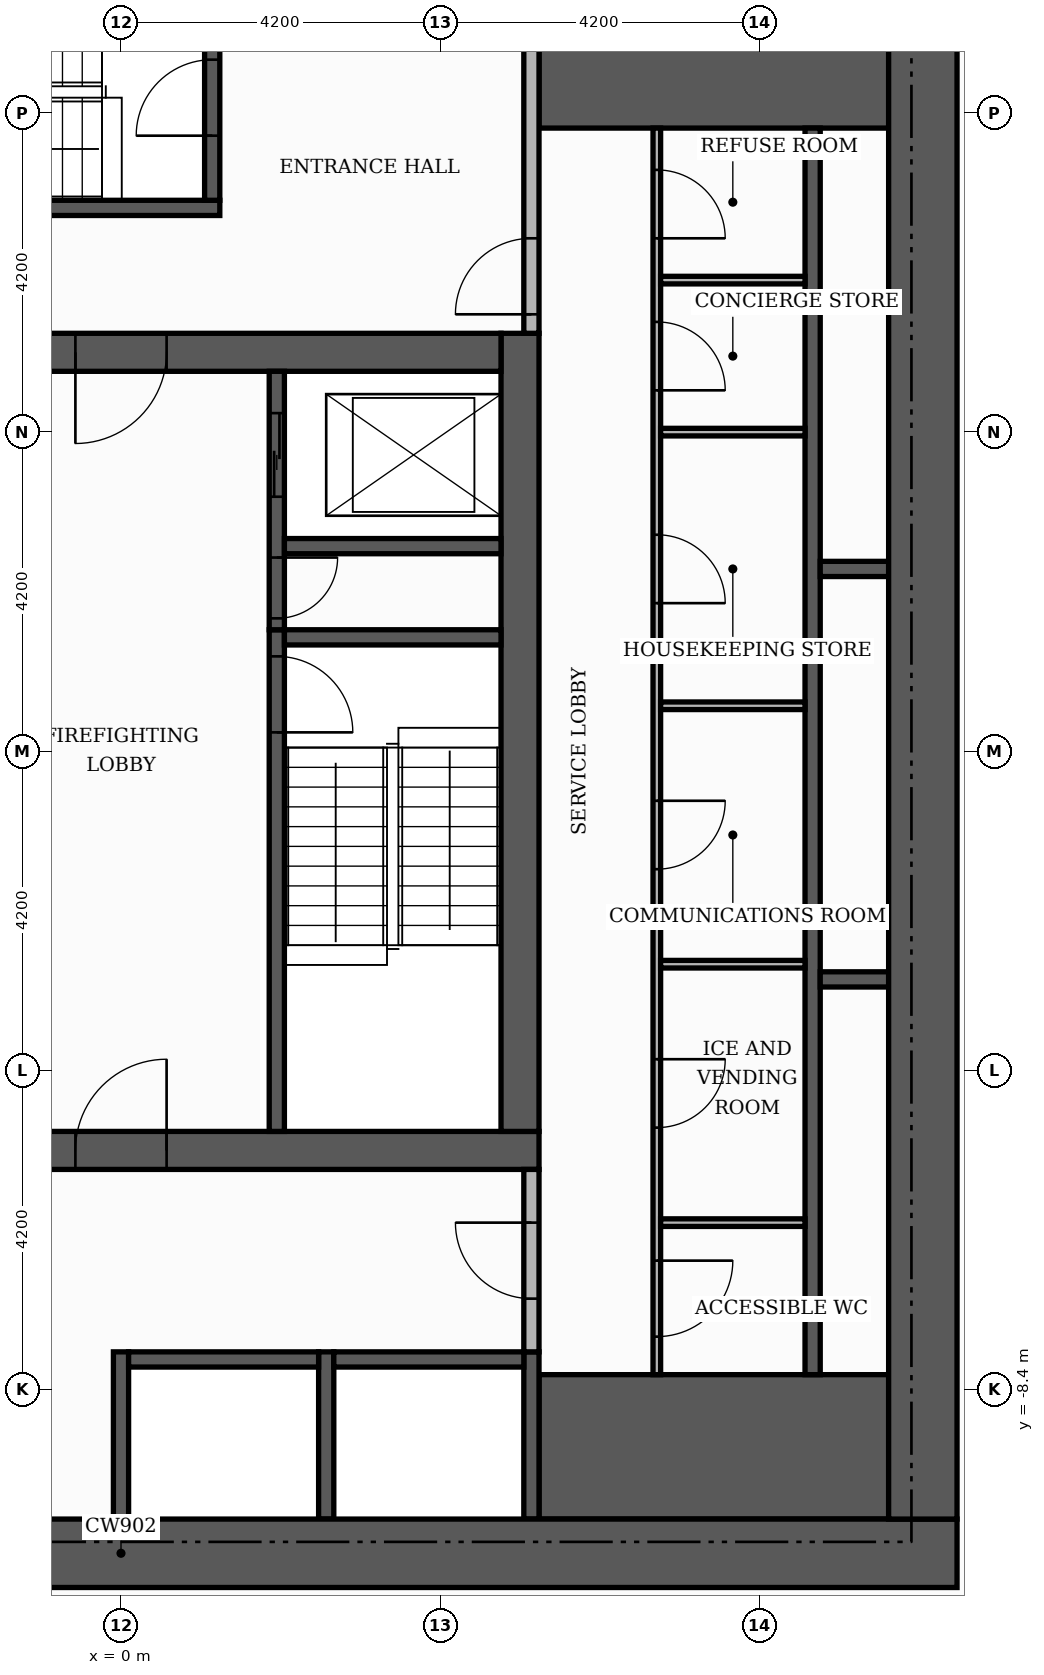
"""IFC4 building model, lengths in metres.
Left out: names, types, materials, properties, quantities, classifications, styles, units other than length and angle.
Written with IfcOpenShell. Run it as: python <this file> out.ifc"""

import sys

from ifc_helpers import new_model, si_unit, direction, frame, frame_2d, origin, place, context, subcontext, project, spatial, rectangle, extrude, element, fill, save


model = new_model("IFC4")
c1 = context("Model", 3, precision=1e-05, world=origin(), true_north=direction((0.0, 1.0)))
c2 = subcontext(c1, "Body", "Model", "MODEL_VIEW")
j1 = project(units=[si_unit("LENGTHUNIT", "METRE"), si_unit("PLANEANGLEUNIT", "RADIAN")], contexts=[c1])
p1 = place(None, origin())
s1 = spatial("IfcSite", under=j1, at=p1, CompositionType="ELEMENT")
p2 = place(p1, origin())
s2 = spatial("IfcBuilding", under=s1, at=p2, CompositionType="ELEMENT")
p3 = place(p2, frame((0.0, 0.0, 106.5)))
s3 = spatial("IfcBuildingStorey", under=s2, at=p3, CompositionType="ELEMENT", Elevation=106.5)
p4 = place(p3, frame((-5.5, -5.25, 0.0), z_axis=(0.0, 0.0, 1.0), x_axis=(1.0, 0.0, 0.0)))
e1 = element("IfcWall", 1, at=p4, inside=s3, PredefinedType="SHEAR", context=c2, shape_type="SweptSolid", body=[
    extrude(rectangle(XDim=11.0, YDim=0.5, at=frame_2d((5.5, 0.0))), origin(), (0.0, 0.0, 1.0), 3.48),
])
p5 = place(p4, frame((4.9, 0.0, 0.0)))
e2 = element("IfcOpeningElement", 2, at=p5, cuts=e1, PredefinedType="OPENING", context=c2, shape_type="SweptSolid", body=[
    extrude(rectangle(XDim=1.2, YDim=2.1, at=frame_2d((0.6, 1.05))), frame((0.0, 0.26, 0.0), z_axis=(0.0, -1.0, 0.0), x_axis=(1.0, 0.0, 0.0)), (0.0, 0.0, 1.0), 0.52),
])
p6 = place(p3, frame((5.25, -5.0, 0.0), z_axis=(0.0, 0.0, 1.0), x_axis=(0.0, 1.0, 0.0)))
e3 = element("IfcWall", 3, at=p6, inside=s3, PredefinedType="SHEAR", context=c2, shape_type="SweptSolid", body=[
    extrude(rectangle(XDim=10.5, YDim=0.5, at=frame_2d((5.25, 0.0))), origin(), (0.0, 0.0, 1.0), 3.48),
])
p7 = place(p3, frame((-5.0, 5.25, 0.0), z_axis=(0.0, 0.0, 1.0), x_axis=(1.0, 0.0, 0.0)))
e4 = element("IfcWall", 4, at=p7, inside=s3, PredefinedType="SHEAR", context=c2, shape_type="SweptSolid", body=[
    extrude(rectangle(XDim=10.0, YDim=0.5, at=frame_2d((5.0, 0.0))), origin(), (0.0, 0.0, 1.0), 3.48),
])
p8 = place(p7, frame((4.4, 0.0, 0.0)))
e5 = element("IfcOpeningElement", 5, at=p8, cuts=e4, PredefinedType="OPENING", context=c2, shape_type="SweptSolid", body=[
    extrude(rectangle(XDim=1.2, YDim=2.1, at=frame_2d((0.6, 1.05))), frame((0.0, 0.26, 0.0), z_axis=(0.0, -1.0, 0.0), x_axis=(1.0, 0.0, 0.0)), (0.0, 0.0, 1.0), 0.52),
])
for number, where, z_axis, x_axis in (
    (6, (5.5, -9.15, 0.0), (0.0, 0.0, 1.0), (1.0, 0.0, 0.0)),
    (7, (5.5, 9.15, 0.0), (0.0, 0.0, 1.0), (1.0, 0.0, 0.0)),
):
    element("IfcWall", number, at=place(p3, frame(where, z_axis=z_axis, x_axis=x_axis)), inside=s3, PredefinedType="SHEAR", context=c2, shape_type="SweptSolid", body=[
        extrude(rectangle(XDim=4.6, YDim=1.9, at=frame_2d((2.3, 0.0))), origin(), (0.0, 0.0, 1.0), 3.48),
    ])
p9 = place(p3, frame((2.05, -5.0, 0.0), z_axis=(0.0, 0.0, 1.0), x_axis=(0.0, 1.0, 0.0)))
e8 = element("IfcWall", 8, at=p9, inside=s3, PredefinedType="SHEAR", context=c2, shape_type="SweptSolid", body=[
    extrude(rectangle(XDim=6.6, YDim=0.2, at=frame_2d((3.3, 0.0))), origin(), (0.0, 0.0, 1.0), 3.48),
])
p10 = place(p9, frame((5.25, 0.0, 0.0)))
e9 = element("IfcOpeningElement", 9, at=p10, cuts=e8, PredefinedType="OPENING", context=c2, shape_type="SweptSolid", body=[
    extrude(rectangle(XDim=1.0, YDim=2.1, at=frame_2d((0.5, 1.05))), frame((0.0, 0.11, 0.0), z_axis=(0.0, -1.0, 0.0), x_axis=(1.0, 0.0, 0.0)), (0.0, 0.0, 1.0), 0.22),
])
p11 = place(p3, frame((2.15, 1.5, 0.0), z_axis=(0.0, 0.0, 1.0), x_axis=(1.0, 0.0, 0.0)))
e10 = element("IfcWall", 10, at=p11, inside=s3, PredefinedType="SHEAR", context=c2, shape_type="SweptSolid", body=[
    extrude(rectangle(XDim=2.85, YDim=0.2, at=frame_2d((1.425, 0.0))), origin(), (0.0, 0.0, 1.0), 3.48),
])
p12 = place(p3, frame((-5.5, 7.15, 0.0), z_axis=(0.0, 0.0, 1.0), x_axis=(1.0, 0.0, 0.0)))
e11 = element("IfcWall", 11, at=p12, inside=s3, PredefinedType="SHEAR", context=c2, shape_type="SweptSolid", body=[
    extrude(rectangle(XDim=6.8, YDim=0.2, at=frame_2d((3.4, 0.0))), origin(), (0.0, 0.0, 1.0), 3.48),
])
p13 = place(p3, frame((1.2, 7.25, 0.0), z_axis=(0.0, 0.0, 1.0), x_axis=(0.0, 1.0, 0.0)))
e12 = element("IfcWall", 12, at=p13, inside=s3, PredefinedType="SHEAR", context=c2, shape_type="SweptSolid", body=[
    extrude(rectangle(XDim=2.85, YDim=0.2, at=frame_2d((1.425, 0.0))), origin(), (0.0, 0.0, 1.0), 3.48),
])
p14 = place(p13, frame((0.85, 0.0, 0.0)))
e13 = element("IfcOpeningElement", 13, at=p14, cuts=e12, PredefinedType="OPENING", context=c2, shape_type="SweptSolid", body=[
    extrude(rectangle(XDim=1.0, YDim=2.1, at=frame_2d((0.5, 1.05))), frame((0.0, 0.11, 0.0), z_axis=(0.0, -1.0, 0.0), x_axis=(1.0, 0.0, 0.0)), (0.0, 0.0, 1.0), 0.22),
])
for number, where, z_axis, x_axis in (
    (14, (0.0, -10.1, 0.0), (0.0, 0.0, 1.0), (0.0, 1.0, 0.0)),
    (15, (2.7, -10.1, 0.0), (0.0, 0.0, 1.0), (0.0, 1.0, 0.0)),
    (16, (5.4, -10.1, 0.0), (0.0, 0.0, 1.0), (0.0, 1.0, 0.0)),
):
    element("IfcWall", number, at=place(p3, frame(where, z_axis=z_axis, x_axis=x_axis)), inside=s3, PredefinedType="SHEAR", context=c2, shape_type="SweptSolid", body=[
        extrude(rectangle(XDim=2.2, YDim=0.2, at=frame_2d((1.1, 0.0))), origin(), (0.0, 0.0, 1.0), 3.48),
    ])
p15 = place(p3, frame((9.1, -8.2, 0.0), z_axis=(0.0, 0.0, 1.0), x_axis=(0.0, 1.0, 0.0)))
e17 = element("IfcWall", 17, at=p15, inside=s3, PredefinedType="SHEAR", context=c2, shape_type="SweptSolid", body=[
    extrude(rectangle(XDim=16.4, YDim=0.2, at=frame_2d((8.2, 0.0))), origin(), (0.0, 0.0, 1.0), 3.48),
])
for number, where, z_axis, x_axis in (
    (18, (0.1, -8.0, 0.0), (0.0, 0.0, 1.0), (1.0, 0.0, 0.0)),
    (19, (2.8, -8.0, 0.0), (0.0, 0.0, 1.0), (1.0, 0.0, 0.0)),
):
    element("IfcWall", number, at=place(p3, frame(where, z_axis=z_axis, x_axis=x_axis)), inside=s3, PredefinedType="SHEAR", context=c2, shape_type="SweptSolid", body=[
        extrude(rectangle(XDim=2.5, YDim=0.2, at=frame_2d((1.25, 0.0))), origin(), (0.0, 0.0, 1.0), 3.48),
    ])
p16 = place(p3, frame((9.2, -3.0, 0.0), z_axis=(0.0, 0.0, 1.0), x_axis=(1.0, 0.0, 0.0)))
e20 = element("IfcWall", 20, at=p16, inside=s3, PredefinedType="SHEAR", context=c2, shape_type="SweptSolid", body=[
    extrude(rectangle(XDim=0.9, YDim=0.2, at=frame_2d((0.45, 0.0))), origin(), (0.0, 0.0, 1.0), 3.48),
])
p17 = place(p3, frame((2.05, 1.6, 0.0), z_axis=(0.0, 0.0, 1.0), x_axis=(0.0, 1.0, 0.0)))
e21 = element("IfcWall", 21, at=p17, inside=s3, PredefinedType="SHEAR", context=c2, shape_type="SweptSolid", body=[
    extrude(rectangle(XDim=3.4, YDim=0.2, at=frame_2d((1.7, 0.0))), origin(), (0.0, 0.0, 1.0), 3.48),
])
p18 = place(p17, frame((1.75, 0.0, 0.0)))
e22 = element("IfcOpeningElement", 22, at=p18, cuts=e21, PredefinedType="OPENING", context=c2, shape_type="SweptSolid", body=[
    extrude(rectangle(XDim=1.1, YDim=2.1, at=frame_2d((0.55, 1.05))), frame((0.0, 0.11, 0.0), z_axis=(0.0, -1.0, 0.0), x_axis=(1.0, 0.0, 0.0)), (0.0, 0.0, 1.0), 0.22),
])
p19 = place(p17, frame((0.15, 0.0, 0.0)))
e23 = element("IfcOpeningElement", 23, at=p19, cuts=e21, PredefinedType="OPENING", context=c2, shape_type="SweptSolid", body=[
    extrude(rectangle(XDim=0.8, YDim=2.1, at=frame_2d((0.4, 1.05))), frame((0.0, 0.11, 0.0), z_axis=(0.0, -1.0, 0.0), x_axis=(1.0, 0.0, 0.0)), (0.0, 0.0, 1.0), 0.22),
])
p20 = place(p3, frame((9.2, 2.4, 0.0), z_axis=(0.0, 0.0, 1.0), x_axis=(1.0, 0.0, 0.0)))
e24 = element("IfcWall", 24, at=p20, inside=s3, PredefinedType="SHEAR", context=c2, shape_type="SweptSolid", body=[
    extrude(rectangle(XDim=0.9, YDim=0.2, at=frame_2d((0.45, 0.0))), origin(), (0.0, 0.0, 1.0), 3.48),
])
p21 = place(p3, frame((2.15, 2.7, 0.0), z_axis=(0.0, 0.0, 1.0), x_axis=(1.0, 0.0, 0.0)))
e25 = element("IfcWall", 25, at=p21, inside=s3, PredefinedType="SHEAR", context=c2, shape_type="SweptSolid", body=[
    extrude(rectangle(XDim=2.85, YDim=0.2, at=frame_2d((1.425, 0.0))), origin(), (0.0, 0.0, 1.0), 3.48),
])
p22 = place(p3, frame((-11.0, -10.55, 0.0), z_axis=(0.0, 0.0, 1.0), x_axis=(1.0, 0.0, 0.0)))
e26 = element("IfcWall", 26, at=p22, inside=s3, PredefinedType="SHEAR", context=c2, shape_type="SweptSolid", body=[
    extrude(rectangle(XDim=22.0, YDim=0.9, at=frame_2d((11.0, 0.0))), origin(), (0.0, 0.0, 1.0), 3.48),
])
p23 = place(p22, frame((7.4, 0.0, 0.0)))
e27 = element("IfcOpeningElement", 27, at=p23, cuts=e26, PredefinedType="OPENING", context=c2, shape_type="SweptSolid", body=[
    extrude(rectangle(XDim=1.8, YDim=2.2, at=frame_2d((0.9, 1.1))), frame((0.0, 0.46, 0.0), z_axis=(0.0, -1.0, 0.0), x_axis=(1.0, 0.0, 0.0)), (0.0, 0.0, 1.0), 0.92),
])
p24 = place(p3, frame((10.55, -10.1, 0.0), z_axis=(0.0, 0.0, 1.0), x_axis=(0.0, 1.0, 0.0)))
e28 = element("IfcWall", 28, at=p24, inside=s3, PredefinedType="SHEAR", context=c2, shape_type="SweptSolid", body=[
    extrude(rectangle(XDim=20.2, YDim=0.9, at=frame_2d((10.1, 0.0))), origin(), (0.0, 0.0, 1.0), 3.48),
])
p25 = place(p3, frame((7.05, -8.2, 0.0), z_axis=(0.0, 0.0, 1.0), x_axis=(0.0, 1.0, 0.0)))
e29 = element("IfcWall", 29, at=p25, inside=s3, PredefinedType="PARTITIONING", context=c2, shape_type="SweptSolid", body=[
    extrude(rectangle(XDim=16.4, YDim=0.1, at=frame_2d((8.2, 0.0))), origin(), (0.0, 0.0, 1.0), 3.48),
])
p26 = place(p25, frame((0.5, 0.0, 0.0)))
e30 = element("IfcOpeningElement", 30, at=p26, cuts=e29, PredefinedType="OPENING", context=c2, shape_type="SweptSolid", body=[
    extrude(rectangle(XDim=1.0, YDim=2.1, at=frame_2d((0.5, 1.05))), frame((0.0, 0.06, 0.0), z_axis=(0.0, -1.0, 0.0), x_axis=(1.0, 0.0, 0.0)), (0.0, 0.0, 1.0), 0.12),
])
p27 = place(p25, frame((3.25, 0.0, 0.0)))
e31 = element("IfcOpeningElement", 31, at=p27, cuts=e29, PredefinedType="OPENING", context=c2, shape_type="SweptSolid", body=[
    extrude(rectangle(XDim=0.9, YDim=2.1, at=frame_2d((0.45, 1.05))), frame((0.0, 0.06, 0.0), z_axis=(0.0, -1.0, 0.0), x_axis=(1.0, 0.0, 0.0)), (0.0, 0.0, 1.0), 0.12),
])
p28 = place(p25, frame((6.65, 0.0, 0.0)))
e32 = element("IfcOpeningElement", 32, at=p28, cuts=e29, PredefinedType="OPENING", context=c2, shape_type="SweptSolid", body=[
    extrude(rectangle(XDim=0.9, YDim=2.1, at=frame_2d((0.45, 1.05))), frame((0.0, 0.06, 0.0), z_axis=(0.0, -1.0, 0.0), x_axis=(1.0, 0.0, 0.0)), (0.0, 0.0, 1.0), 0.12),
])
p29 = place(p25, frame((10.15, 0.0, 0.0)))
e33 = element("IfcOpeningElement", 33, at=p29, cuts=e29, PredefinedType="OPENING", context=c2, shape_type="SweptSolid", body=[
    extrude(rectangle(XDim=0.9, YDim=2.1, at=frame_2d((0.45, 1.05))), frame((0.0, 0.06, 0.0), z_axis=(0.0, -1.0, 0.0), x_axis=(1.0, 0.0, 0.0)), (0.0, 0.0, 1.0), 0.12),
])
p30 = place(p25, frame((12.95, 0.0, 0.0)))
e34 = element("IfcOpeningElement", 34, at=p30, cuts=e29, PredefinedType="OPENING", context=c2, shape_type="SweptSolid", body=[
    extrude(rectangle(XDim=0.9, YDim=2.1, at=frame_2d((0.45, 1.05))), frame((0.0, 0.06, 0.0), z_axis=(0.0, -1.0, 0.0), x_axis=(1.0, 0.0, 0.0)), (0.0, 0.0, 1.0), 0.12),
])
p31 = place(p25, frame((14.95, 0.0, 0.0)))
e35 = element("IfcOpeningElement", 35, at=p31, cuts=e29, PredefinedType="OPENING", context=c2, shape_type="SweptSolid", body=[
    extrude(rectangle(XDim=0.9, YDim=2.1, at=frame_2d((0.45, 1.05))), frame((0.0, 0.06, 0.0), z_axis=(0.0, -1.0, 0.0), x_axis=(1.0, 0.0, 0.0)), (0.0, 0.0, 1.0), 0.12),
])
p32 = place(p3, frame((5.4, -7.9, 0.0), z_axis=(0.0, 0.0, 1.0), x_axis=(0.0, 1.0, 0.0)))
e36 = element("IfcWall", 36, at=p32, inside=s3, PredefinedType="PARTITIONING", context=c2, shape_type="SweptSolid", body=[
    extrude(rectangle(XDim=2.4, YDim=0.2, at=frame_2d((1.2, 0.0))), origin(), (0.0, 0.0, 1.0), 3.48),
])
p33 = place(p32, frame((0.7, 0.0, 0.0)))
e37 = element("IfcOpeningElement", 37, at=p33, cuts=e36, PredefinedType="OPENING", context=c2, shape_type="SweptSolid", body=[
    extrude(rectangle(XDim=1.0, YDim=2.1, at=frame_2d((0.5, 1.05))), frame((0.0, 0.11, 0.0), z_axis=(0.0, -1.0, 0.0), x_axis=(1.0, 0.0, 0.0)), (0.0, 0.0, 1.0), 0.22),
])
for number, where, z_axis, x_axis in (
    (38, (7.1, -6.2, 0.0), (0.0, 0.0, 1.0), (1.0, 0.0, 0.0)),
    (39, (7.1, -2.8, 0.0), (0.0, 0.0, 1.0), (1.0, 0.0, 0.0)),
    (40, (7.1, 0.6, 0.0), (0.0, 0.0, 1.0), (1.0, 0.0, 0.0)),
    (41, (7.1, 4.2, 0.0), (0.0, 0.0, 1.0), (1.0, 0.0, 0.0)),
):
    element("IfcWall", number, at=place(p3, frame(where, z_axis=z_axis, x_axis=x_axis)), inside=s3, PredefinedType="PARTITIONING", context=c2, shape_type="SweptSolid", body=[
        extrude(rectangle(XDim=1.9, YDim=0.1, at=frame_2d((0.95, 0.0))), origin(), (0.0, 0.0, 1.0), 3.48),
    ])
p34 = place(p3, frame((5.4, 5.5, 0.0), z_axis=(0.0, 0.0, 1.0), x_axis=(0.0, 1.0, 0.0)))
e42 = element("IfcWall", 42, at=p34, inside=s3, PredefinedType="PARTITIONING", context=c2, shape_type="SweptSolid", body=[
    extrude(rectangle(XDim=4.6, YDim=0.2, at=frame_2d((2.3, 0.0))), origin(), (0.0, 0.0, 1.0), 3.48),
])
p35 = place(p34, frame((0.25, 0.0, 0.0)))
e43 = element("IfcOpeningElement", 43, at=p35, cuts=e42, PredefinedType="OPENING", context=c2, shape_type="SweptSolid", body=[
    extrude(rectangle(XDim=1.0, YDim=2.1, at=frame_2d((0.5, 1.05))), frame((0.0, 0.11, 0.0), z_axis=(0.0, -1.0, 0.0), x_axis=(1.0, 0.0, 0.0)), (0.0, 0.0, 1.0), 0.22),
])
p36 = place(p3, frame((7.1, 6.2, 0.0), z_axis=(0.0, 0.0, 1.0), x_axis=(1.0, 0.0, 0.0)))
e44 = element("IfcWall", 44, at=p36, inside=s3, PredefinedType="PARTITIONING", context=c2, shape_type="SweptSolid", body=[
    extrude(rectangle(XDim=1.9, YDim=0.1, at=frame_2d((0.95, 0.0))), origin(), (0.0, 0.0, 1.0), 3.48),
])
p37 = place(p18, origin())
e45 = element("IfcDoor", 45, at=p37, inside=s3, OperationType="SLIDING_TO_LEFT", PredefinedType="DOOR", context=c2, shape_type="SweptSolid", body=[
    extrude(rectangle(XDim=1.1, YDim=2.1, at=frame_2d((0.55, 1.05))), frame((0.0, 0.025, 0.0), z_axis=(0.0, -1.0, 0.0), x_axis=(1.0, 0.0, 0.0)), (0.0, 0.0, 1.0), 0.05),
])
fill(e22, e45)
p38 = place(p10, frame((1.0, 0.0, 0.0), z_axis=(0.0, 0.0, 1.0), x_axis=(-1.0, 0.0, 0.0)))
e46 = element("IfcDoor", 46, at=p38, inside=s3, OperationType="SINGLE_SWING_LEFT", PredefinedType="DOOR", context=c2, shape_type="SweptSolid", body=[
    extrude(rectangle(XDim=1.0, YDim=2.1, at=frame_2d((0.5, 1.05))), frame((0.0, 0.025, 0.0), z_axis=(0.0, -1.0, 0.0), x_axis=(1.0, 0.0, 0.0)), (0.0, 0.0, 1.0), 0.05),
])
fill(e9, e46)
p39 = place(p19, frame((0.8, 0.0, 0.0), z_axis=(0.0, 0.0, 1.0), x_axis=(-1.0, 0.0, 0.0)))
e47 = element("IfcDoor", 47, at=p39, inside=s3, OperationType="SINGLE_SWING_RIGHT", PredefinedType="DOOR", context=c2, shape_type="SweptSolid", body=[
    extrude(rectangle(XDim=0.8, YDim=2.1, at=frame_2d((0.4, 1.05))), frame((0.0, 0.025, 0.0), z_axis=(0.0, -1.0, 0.0), x_axis=(1.0, 0.0, 0.0)), (0.0, 0.0, 1.0), 0.05),
])
fill(e23, e47)
p40 = place(p8, frame((1.2, 0.0, 0.0), z_axis=(0.0, 0.0, 1.0), x_axis=(-1.0, 0.0, 0.0)))
e48 = element("IfcDoor", 48, at=p40, inside=s3, OperationType="SINGLE_SWING_LEFT", PredefinedType="DOOR", context=c2, shape_type="SweptSolid", body=[
    extrude(rectangle(XDim=1.2, YDim=2.1, at=frame_2d((0.6, 1.05))), frame((0.0, 0.025, 0.0), z_axis=(0.0, -1.0, 0.0), x_axis=(1.0, 0.0, 0.0)), (0.0, 0.0, 1.0), 0.05),
])
fill(e5, e48)
p41 = place(p5, origin())
e49 = element("IfcDoor", 49, at=p41, inside=s3, OperationType="SINGLE_SWING_RIGHT", PredefinedType="DOOR", context=c2, shape_type="SweptSolid", body=[
    extrude(rectangle(XDim=1.2, YDim=2.1, at=frame_2d((0.6, 1.05))), frame((0.0, 0.025, 0.0), z_axis=(0.0, -1.0, 0.0), x_axis=(1.0, 0.0, 0.0)), (0.0, 0.0, 1.0), 0.05),
])
fill(e2, e49)
p42 = place(p14, origin())
e50 = element("IfcDoor", 50, at=p42, inside=s3, OperationType="SINGLE_SWING_LEFT", PredefinedType="DOOR", context=c2, shape_type="SweptSolid", body=[
    extrude(rectangle(XDim=1.0, YDim=2.1, at=frame_2d((0.5, 1.05))), frame((0.0, 0.025, 0.0), z_axis=(0.0, -1.0, 0.0), x_axis=(1.0, 0.0, 0.0)), (0.0, 0.0, 1.0), 0.05),
])
fill(e13, e50)
p43 = place(p35, origin())
e51 = element("IfcDoor", 51, at=p43, inside=s3, OperationType="SINGLE_SWING_LEFT", PredefinedType="DOOR", context=c2, shape_type="SweptSolid", body=[
    extrude(rectangle(XDim=1.0, YDim=2.1, at=frame_2d((0.5, 1.05))), frame((0.0, 0.025, 0.0), z_axis=(0.0, -1.0, 0.0), x_axis=(1.0, 0.0, 0.0)), (0.0, 0.0, 1.0), 0.05),
])
fill(e43, e51)
p44 = place(p33, origin())
e52 = element("IfcDoor", 52, at=p44, inside=s3, OperationType="SINGLE_SWING_RIGHT", PredefinedType="DOOR", context=c2, shape_type="SweptSolid", body=[
    extrude(rectangle(XDim=1.0, YDim=2.1, at=frame_2d((0.5, 1.05))), frame((0.0, 0.025, 0.0), z_axis=(0.0, -1.0, 0.0), x_axis=(1.0, 0.0, 0.0)), (0.0, 0.0, 1.0), 0.05),
])
fill(e37, e52)
p45 = place(p26, frame((1.0, 0.0, 0.0), z_axis=(0.0, 0.0, 1.0), x_axis=(-1.0, 0.0, 0.0)))
e53 = element("IfcDoor", 53, at=p45, inside=s3, OperationType="SINGLE_SWING_RIGHT", PredefinedType="DOOR", context=c2, shape_type="SweptSolid", body=[
    extrude(rectangle(XDim=1.0, YDim=2.1, at=frame_2d((0.5, 1.05))), frame((0.0, 0.025, 0.0), z_axis=(0.0, -1.0, 0.0), x_axis=(1.0, 0.0, 0.0)), (0.0, 0.0, 1.0), 0.05),
])
fill(e30, e53)
p46 = place(p27, frame((0.9, 0.0, 0.0), z_axis=(0.0, 0.0, 1.0), x_axis=(-1.0, 0.0, 0.0)))
e54 = element("IfcDoor", 54, at=p46, inside=s3, OperationType="SINGLE_SWING_RIGHT", PredefinedType="DOOR", context=c2, shape_type="SweptSolid", body=[
    extrude(rectangle(XDim=0.9, YDim=2.1, at=frame_2d((0.45, 1.05))), frame((0.0, 0.025, 0.0), z_axis=(0.0, -1.0, 0.0), x_axis=(1.0, 0.0, 0.0)), (0.0, 0.0, 1.0), 0.05),
])
fill(e31, e54)
p47 = place(p28, frame((0.9, 0.0, 0.0), z_axis=(0.0, 0.0, 1.0), x_axis=(-1.0, 0.0, 0.0)))
e55 = element("IfcDoor", 55, at=p47, inside=s3, OperationType="SINGLE_SWING_RIGHT", PredefinedType="DOOR", context=c2, shape_type="SweptSolid", body=[
    extrude(rectangle(XDim=0.9, YDim=2.1, at=frame_2d((0.45, 1.05))), frame((0.0, 0.025, 0.0), z_axis=(0.0, -1.0, 0.0), x_axis=(1.0, 0.0, 0.0)), (0.0, 0.0, 1.0), 0.05),
])
fill(e32, e55)
p48 = place(p29, frame((0.9, 0.0, 0.0), z_axis=(0.0, 0.0, 1.0), x_axis=(-1.0, 0.0, 0.0)))
e56 = element("IfcDoor", 56, at=p48, inside=s3, OperationType="SINGLE_SWING_LEFT", PredefinedType="DOOR", context=c2, shape_type="SweptSolid", body=[
    extrude(rectangle(XDim=0.9, YDim=2.1, at=frame_2d((0.45, 1.05))), frame((0.0, 0.025, 0.0), z_axis=(0.0, -1.0, 0.0), x_axis=(1.0, 0.0, 0.0)), (0.0, 0.0, 1.0), 0.05),
])
fill(e33, e56)
p49 = place(p30, frame((0.9, 0.0, 0.0), z_axis=(0.0, 0.0, 1.0), x_axis=(-1.0, 0.0, 0.0)))
e57 = element("IfcDoor", 57, at=p49, inside=s3, OperationType="SINGLE_SWING_LEFT", PredefinedType="DOOR", context=c2, shape_type="SweptSolid", body=[
    extrude(rectangle(XDim=0.9, YDim=2.1, at=frame_2d((0.45, 1.05))), frame((0.0, 0.025, 0.0), z_axis=(0.0, -1.0, 0.0), x_axis=(1.0, 0.0, 0.0)), (0.0, 0.0, 1.0), 0.05),
])
fill(e34, e57)
p50 = place(p31, frame((0.9, 0.0, 0.0), z_axis=(0.0, 0.0, 1.0), x_axis=(-1.0, 0.0, 0.0)))
e58 = element("IfcDoor", 58, at=p50, inside=s3, OperationType="SINGLE_SWING_LEFT", PredefinedType="DOOR", context=c2, shape_type="SweptSolid", body=[
    extrude(rectangle(XDim=0.9, YDim=2.1, at=frame_2d((0.45, 1.05))), frame((0.0, 0.025, 0.0), z_axis=(0.0, -1.0, 0.0), x_axis=(1.0, 0.0, 0.0)), (0.0, 0.0, 1.0), 0.05),
])
fill(e35, e58)
save(model, sys.argv[1])
